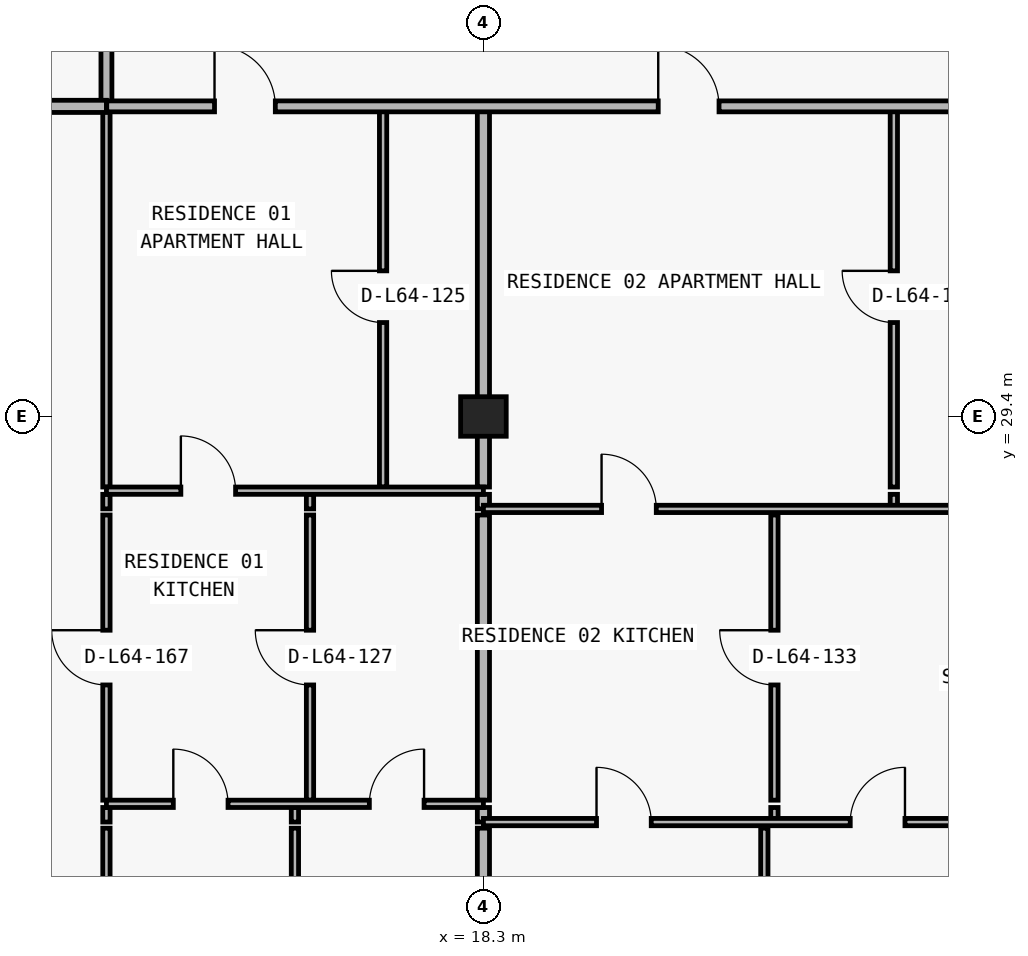
"""IFC4 building model, lengths in metres.
Left out: names, types, materials, properties, quantities, classifications, styles, units other than length and angle.
Written with IfcOpenShell. Run it as: python <this file> out.ifc"""

import sys

from ifc_helpers import new_model, si_unit, direction, frame, frame_2d, origin, origin_2d, place, context, subcontext, project, spatial, rectangle, extrude, element, fill, save


model = new_model("IFC4")
c1 = context("Model", 3, precision=1e-05, world=origin(), true_north=direction((0.0, 1.0)))
c2 = subcontext(c1, "Body", "Model", "MODEL_VIEW")
j1 = project(units=[si_unit("LENGTHUNIT", "METRE"), si_unit("PLANEANGLEUNIT", "RADIAN")], contexts=[c1])
p1 = place(None, origin())
s1 = spatial("IfcSite", under=j1, at=p1, CompositionType="ELEMENT")
p2 = place(p1, origin())
s2 = spatial("IfcBuilding", under=s1, at=p2, CompositionType="ELEMENT")
p3 = place(p2, frame((0.0, 0.0, 229.8)))
s3 = spatial("IfcBuildingStorey", under=s2, at=p3, CompositionType="ELEMENT", Elevation=229.8)
p4 = place(p3, frame((18.3, 29.4, 0.0), z_axis=(0.0, 0.0, 1.0), x_axis=(1.0, 0.0, 0.0)))
e1 = element("IfcColumn", 1, at=p4, inside=s3, PredefinedType="COLUMN", context=c2, shape_type="SweptSolid", body=[
    extrude(rectangle(XDim=0.75, YDim=0.65, at=origin_2d()), origin(), (0.0, 0.0, 1.0), 3.05),
])
p5 = place(p3, frame((12.1, 13.385, 0.0), z_axis=(0.0, 0.0, 1.0), x_axis=(0.0, 1.0, 0.0)))
e2 = element("IfcWall", 2, at=p5, inside=s3, PredefinedType="PARTITIONING", context=c2, shape_type="SweptSolid", body=[
    extrude(rectangle(XDim=9.245, YDim=0.12, at=frame_2d((4.623, 0.0))), origin(), (0.0, 0.0, 1.0), 3.05),
])
p6 = place(p3, frame((12.1, 22.73, 0.0), z_axis=(0.0, 0.0, 1.0), x_axis=(0.0, 1.0, 0.0)))
e3 = element("IfcWall", 3, at=p6, inside=s3, PredefinedType="PARTITIONING", context=c2, shape_type="SweptSolid", body=[
    extrude(rectangle(XDim=0.24, YDim=0.12, at=frame_2d((0.12, 0.0))), origin(), (0.0, 0.0, 1.0), 3.05),
])
p7 = place(p3, frame((12.1, 23.09, 0.0), z_axis=(0.0, 0.0, 1.0), x_axis=(0.0, 1.0, 0.0)))
e4 = element("IfcWall", 4, at=p7, inside=s3, PredefinedType="PARTITIONING", context=c2, shape_type="SweptSolid", body=[
    extrude(rectangle(XDim=4.69, YDim=0.12, at=frame_2d((2.345, 0.0))), origin(), (0.0, 0.0, 1.0), 3.05),
])
p8 = place(p7, frame((1.895, 0.0, 0.0)))
e5 = element("IfcOpeningElement", 5, at=p8, cuts=e4, PredefinedType="OPENING", context=c2, shape_type="SweptSolid", body=[
    extrude(rectangle(XDim=0.9, YDim=2.15, at=frame_2d((0.45, 1.075))), frame((0.0, 0.07, 0.0), z_axis=(0.0, -1.0, 0.0), x_axis=(1.0, 0.0, 0.0)), (0.0, 0.0, 1.0), 0.14),
])
p9 = place(p3, frame((12.1, 27.88, 0.0), z_axis=(0.0, 0.0, 1.0), x_axis=(0.0, 1.0, 0.0)))
e6 = element("IfcWall", 6, at=p9, inside=s3, PredefinedType="PARTITIONING", context=c2, shape_type="SweptSolid", body=[
    extrude(rectangle(XDim=0.24, YDim=0.12, at=frame_2d((0.12, 0.0))), origin(), (0.0, 0.0, 1.0), 3.05),
])
p10 = place(p3, frame((12.1, 28.24, 0.0), z_axis=(0.0, 0.0, 1.0), x_axis=(0.0, 1.0, 0.0)))
e7 = element("IfcWall", 7, at=p10, inside=s3, PredefinedType="PARTITIONING", context=c2, shape_type="SweptSolid", body=[
    extrude(rectangle(XDim=6.26, YDim=0.12, at=frame_2d((3.13, 0.0))), origin(), (0.0, 0.0, 1.0), 3.05),
])
p11 = place(p3, frame((12.1, 34.505, 0.0), z_axis=(0.0, 0.0, 1.0), x_axis=(0.0, 1.0, 0.0)))
e8 = element("IfcWall", 8, at=p11, inside=s3, PredefinedType="PARTITIONING", context=c2, shape_type="SweptSolid", body=[
    extrude(rectangle(XDim=2.495, YDim=0.18, at=frame_2d((1.248, 0.0))), origin(), (0.0, 0.0, 1.0), 3.05),
])
p12 = place(p3, frame((15.2, 13.34, 0.0), z_axis=(0.0, 0.0, 1.0), x_axis=(0.0, 1.0, 0.0)))
e9 = element("IfcWall", 9, at=p12, inside=s3, PredefinedType="PARTITIONING", context=c2, shape_type="SweptSolid", body=[
    extrude(rectangle(XDim=9.29, YDim=0.12, at=frame_2d((4.645, 0.0))), origin(), (0.0, 0.0, 1.0), 3.05),
])
p13 = place(p3, frame((15.2, 22.73, 0.0), z_axis=(0.0, 0.0, 1.0), x_axis=(0.0, 1.0, 0.0)))
e10 = element("IfcWall", 10, at=p13, inside=s3, PredefinedType="PARTITIONING", context=c2, shape_type="SweptSolid", body=[
    extrude(rectangle(XDim=0.24, YDim=0.12, at=frame_2d((0.12, 0.0))), origin(), (0.0, 0.0, 1.0), 3.05),
])
p14 = place(p3, frame((15.448, 23.09, 0.0), z_axis=(0.0, 0.0, 1.0), x_axis=(0.0, 1.0, 0.0)))
e11 = element("IfcWall", 11, at=p14, inside=s3, PredefinedType="PARTITIONING", context=c2, shape_type="SweptSolid", body=[
    extrude(rectangle(XDim=4.69, YDim=0.12, at=frame_2d((2.345, 0.0))), origin(), (0.0, 0.0, 1.0), 2.725),
])
p15 = place(p14, frame((1.895, 0.0, 0.0)))
e12 = element("IfcOpeningElement", 12, at=p15, cuts=e11, PredefinedType="OPENING", context=c2, shape_type="SweptSolid", body=[
    extrude(rectangle(XDim=0.9, YDim=2.15, at=frame_2d((0.45, 1.075))), frame((0.0, 0.07, 0.0), z_axis=(0.0, -1.0, 0.0), x_axis=(1.0, 0.0, 0.0)), (0.0, 0.0, 1.0), 0.14),
])
p16 = place(p3, frame((15.448, 27.88, 0.0), z_axis=(0.0, 0.0, 1.0), x_axis=(0.0, 1.0, 0.0)))
e13 = element("IfcWall", 13, at=p16, inside=s3, PredefinedType="PARTITIONING", context=c2, shape_type="SweptSolid", body=[
    extrude(rectangle(XDim=0.24, YDim=0.12, at=frame_2d((0.12, 0.0))), origin(), (0.0, 0.0, 1.0), 2.725),
])
p17 = place(p3, frame((16.65, 28.24, 0.0), z_axis=(0.0, 0.0, 1.0), x_axis=(0.0, 1.0, 0.0)))
e14 = element("IfcWall", 14, at=p17, inside=s3, PredefinedType="PARTITIONING", context=c2, shape_type="SweptSolid", body=[
    extrude(rectangle(XDim=6.26, YDim=0.12, at=frame_2d((3.13, 0.0))), origin(), (0.0, 0.0, 1.0), 3.05),
])
p18 = place(p17, frame((2.705, 0.0, 0.0)))
e15 = element("IfcOpeningElement", 15, at=p18, cuts=e14, PredefinedType="OPENING", context=c2, shape_type="SweptSolid", body=[
    extrude(rectangle(XDim=0.85, YDim=2.1, at=frame_2d((0.425, 1.05))), frame((0.0, 0.07, 0.0), z_axis=(0.0, -1.0, 0.0), x_axis=(1.0, 0.0, 0.0)), (0.0, 0.0, 1.0), 0.14),
])
p19 = place(p3, frame((18.3, 13.34, 0.0), z_axis=(0.0, 0.0, 1.0), x_axis=(0.0, 1.0, 0.0)))
e16 = element("IfcWall", 16, at=p19, inside=s3, PredefinedType="PARTITIONING", context=c2, shape_type="SweptSolid", body=[
    extrude(rectangle(XDim=9.29, YDim=0.2, at=frame_2d((4.645, 0.0))), origin(), (0.0, 0.0, 1.0), 2.263),
])
p20 = place(p3, frame((18.3, 22.73, 0.0), z_axis=(0.0, 0.0, 1.0), x_axis=(0.0, 1.0, 0.0)))
e17 = element("IfcWall", 17, at=p20, inside=s3, PredefinedType="PARTITIONING", context=c2, shape_type="SweptSolid", body=[
    extrude(rectangle(XDim=0.24, YDim=0.2, at=frame_2d((0.12, 0.0))), origin(), (0.0, 0.0, 1.0), 2.263),
])
p21 = place(p3, frame((18.3, 23.09, 0.0), z_axis=(0.0, 0.0, 1.0), x_axis=(0.0, 1.0, 0.0)))
e18 = element("IfcWall", 18, at=p21, inside=s3, PredefinedType="PARTITIONING", context=c2, shape_type="SweptSolid", body=[
    extrude(rectangle(XDim=4.69, YDim=0.2, at=frame_2d((2.345, 0.0))), origin(), (0.0, 0.0, 1.0), 2.263),
])
p22 = place(p3, frame((18.3, 27.88, 0.0), z_axis=(0.0, 0.0, 1.0), x_axis=(0.0, 1.0, 0.0)))
e19 = element("IfcWall", 19, at=p22, inside=s3, PredefinedType="PARTITIONING", context=c2, shape_type="SweptSolid", body=[
    extrude(rectangle(XDim=0.24, YDim=0.2, at=frame_2d((0.12, 0.0))), origin(), (0.0, 0.0, 1.0), 2.263),
])
p23 = place(p3, frame((18.3, 28.24, 0.0), z_axis=(0.0, 0.0, 1.0), x_axis=(0.0, 1.0, 0.0)))
e20 = element("IfcWall", 20, at=p23, inside=s3, PredefinedType="PARTITIONING", context=c2, shape_type="SweptSolid", body=[
    extrude(rectangle(XDim=6.26, YDim=0.2, at=frame_2d((3.13, 0.0))), origin(), (0.0, 0.0, 1.0), 2.263),
])
p24 = place(p3, frame((22.92, 13.34, 0.0), z_axis=(0.0, 0.0, 1.0), x_axis=(0.0, 1.0, 0.0)))
e21 = element("IfcWall", 21, at=p24, inside=s3, PredefinedType="PARTITIONING", context=c2, shape_type="SweptSolid", body=[
    extrude(rectangle(XDim=9.29, YDim=0.12, at=frame_2d((4.645, 0.0))), origin(), (0.0, 0.0, 1.0), 3.05),
])
p25 = place(p3, frame((23.086, 22.73, 0.0), z_axis=(0.0, 0.0, 1.0), x_axis=(0.0, 1.0, 0.0)))
e22 = element("IfcWall", 22, at=p25, inside=s3, PredefinedType="PARTITIONING", context=c2, shape_type="SweptSolid", body=[
    extrude(rectangle(XDim=0.24, YDim=0.12, at=frame_2d((0.12, 0.0))), origin(), (0.0, 0.0, 1.0), 3.05),
])
p26 = place(p3, frame((23.086, 23.09, 0.0), z_axis=(0.0, 0.0, 1.0), x_axis=(0.0, 1.0, 0.0)))
e23 = element("IfcWall", 23, at=p26, inside=s3, PredefinedType="PARTITIONING", context=c2, shape_type="SweptSolid", body=[
    extrude(rectangle(XDim=4.69, YDim=0.12, at=frame_2d((2.345, 0.0))), origin(), (0.0, 0.0, 1.0), 3.05),
])
p27 = place(p26, frame((1.895, 0.0, 0.0)))
e24 = element("IfcOpeningElement", 24, at=p27, cuts=e23, PredefinedType="OPENING", context=c2, shape_type="SweptSolid", body=[
    extrude(rectangle(XDim=0.9, YDim=2.15, at=frame_2d((0.45, 1.075))), frame((0.0, 0.07, 0.0), z_axis=(0.0, -1.0, 0.0), x_axis=(1.0, 0.0, 0.0)), (0.0, 0.0, 1.0), 0.14),
])
p28 = place(p3, frame((25.05, 27.88, 0.0), z_axis=(0.0, 0.0, 1.0), x_axis=(0.0, 1.0, 0.0)))
e25 = element("IfcWall", 25, at=p28, inside=s3, PredefinedType="PARTITIONING", context=c2, shape_type="SweptSolid", body=[
    extrude(rectangle(XDim=0.24, YDim=0.12, at=frame_2d((0.12, 0.0))), origin(), (0.0, 0.0, 1.0), 3.05),
])
p29 = place(p3, frame((25.05, 28.24, 0.0), z_axis=(0.0, 0.0, 1.0), x_axis=(0.0, 1.0, 0.0)))
e26 = element("IfcWall", 26, at=p29, inside=s3, PredefinedType="PARTITIONING", context=c2, shape_type="SweptSolid", body=[
    extrude(rectangle(XDim=6.26, YDim=0.12, at=frame_2d((3.13, 0.0))), origin(), (0.0, 0.0, 1.0), 3.05),
])
p30 = place(p29, frame((2.705, 0.0, 0.0)))
e27 = element("IfcOpeningElement", 27, at=p30, cuts=e26, PredefinedType="OPENING", context=c2, shape_type="SweptSolid", body=[
    extrude(rectangle(XDim=0.85, YDim=2.1, at=frame_2d((0.425, 1.05))), frame((0.0, 0.07, 0.0), z_axis=(0.0, -1.0, 0.0), x_axis=(1.0, 0.0, 0.0)), (0.0, 0.0, 1.0), 0.14),
])
p31 = place(p3, frame((18.3, 22.73, 0.0), z_axis=(0.0, 0.0, 1.0), x_axis=(1.0, 0.0, 0.0)))
e28 = element("IfcWall", 28, at=p31, inside=s3, PredefinedType="PARTITIONING", context=c2, shape_type="SweptSolid", body=[
    extrude(rectangle(XDim=8.18, YDim=0.12, at=frame_2d((4.09, 0.0))), origin(), (0.0, 0.0, 1.0), 3.05),
])
p32 = place(p31, frame((1.86, 0.0, 0.0)))
e29 = element("IfcOpeningElement", 29, at=p32, cuts=e28, PredefinedType="OPENING", context=c2, shape_type="SweptSolid", body=[
    extrude(rectangle(XDim=0.9, YDim=2.15, at=frame_2d((0.45, 1.075))), frame((0.0, 0.07, 0.0), z_axis=(0.0, -1.0, 0.0), x_axis=(1.0, 0.0, 0.0)), (0.0, 0.0, 1.0), 0.14),
])
p33 = place(p31, frame((6.033, 0.0, 0.0)))
e30 = element("IfcOpeningElement", 30, at=p33, cuts=e28, PredefinedType="OPENING", context=c2, shape_type="SweptSolid", body=[
    extrude(rectangle(XDim=0.9, YDim=2.15, at=frame_2d((0.45, 1.075))), frame((0.0, 0.07, 0.0), z_axis=(0.0, -1.0, 0.0), x_axis=(1.0, 0.0, 0.0)), (0.0, 0.0, 1.0), 0.14),
])
p34 = place(p3, frame((12.1, 23.03, 0.0), z_axis=(0.0, 0.0, 1.0), x_axis=(1.0, 0.0, 0.0)))
e31 = element("IfcWall", 31, at=p34, inside=s3, PredefinedType="PARTITIONING", context=c2, shape_type="SweptSolid", body=[
    extrude(rectangle(XDim=6.2, YDim=0.12, at=frame_2d((3.1, 0.0))), origin(), (0.0, 0.0, 1.0), 3.05),
])
p35 = place(p34, frame((1.1, 0.0, 0.0)))
e32 = element("IfcOpeningElement", 32, at=p35, cuts=e31, PredefinedType="OPENING", context=c2, shape_type="SweptSolid", body=[
    extrude(rectangle(XDim=0.9, YDim=2.15, at=frame_2d((0.45, 1.075))), frame((0.0, 0.07, 0.0), z_axis=(0.0, -1.0, 0.0), x_axis=(1.0, 0.0, 0.0)), (0.0, 0.0, 1.0), 0.14),
])
p36 = place(p34, frame((4.324, 0.0, 0.0)))
e33 = element("IfcOpeningElement", 33, at=p36, cuts=e31, PredefinedType="OPENING", context=c2, shape_type="SweptSolid", body=[
    extrude(rectangle(XDim=0.9, YDim=2.15, at=frame_2d((0.45, 1.075))), frame((0.0, 0.07, 0.0), z_axis=(0.0, -1.0, 0.0), x_axis=(1.0, 0.0, 0.0)), (0.0, 0.0, 1.0), 0.14),
])
p37 = place(p3, frame((18.3, 27.88, 0.0), z_axis=(0.0, 0.0, 1.0), x_axis=(1.0, 0.0, 0.0)))
e34 = element("IfcWall", 34, at=p37, inside=s3, PredefinedType="PARTITIONING", context=c2, shape_type="SweptSolid", body=[
    extrude(rectangle(XDim=8.18, YDim=0.12, at=frame_2d((4.09, 0.0))), origin(), (0.0, 0.0, 1.0), 3.05),
])
p38 = place(p37, frame((1.943, 0.0, 0.0)))
e35 = element("IfcOpeningElement", 35, at=p38, cuts=e34, PredefinedType="OPENING", context=c2, shape_type="SweptSolid", body=[
    extrude(rectangle(XDim=0.9, YDim=2.15, at=frame_2d((0.45, 1.075))), frame((0.0, 0.07, 0.0), z_axis=(0.0, -1.0, 0.0), x_axis=(1.0, 0.0, 0.0)), (0.0, 0.0, 1.0), 0.14),
])
p39 = place(p3, frame((12.1, 28.18, 0.0), z_axis=(0.0, 0.0, 1.0), x_axis=(1.0, 0.0, 0.0)))
e36 = element("IfcWall", 36, at=p39, inside=s3, PredefinedType="PARTITIONING", context=c2, shape_type="SweptSolid", body=[
    extrude(rectangle(XDim=6.2, YDim=0.12, at=frame_2d((3.1, 0.0))), origin(), (0.0, 0.0, 1.0), 3.05),
])
p40 = place(p39, frame((1.224, 0.0, 0.0)))
e37 = element("IfcOpeningElement", 37, at=p40, cuts=e36, PredefinedType="OPENING", context=c2, shape_type="SweptSolid", body=[
    extrude(rectangle(XDim=0.9, YDim=2.15, at=frame_2d((0.45, 1.075))), frame((0.0, 0.07, 0.0), z_axis=(0.0, -1.0, 0.0), x_axis=(1.0, 0.0, 0.0)), (0.0, 0.0, 1.0), 0.14),
])
p41 = place(p3, frame((8.395, 34.5, 0.0), z_axis=(0.0, 0.0, 1.0), x_axis=(1.0, 0.0, 0.0)))
e38 = element("IfcWall", 38, at=p41, inside=s3, PredefinedType="PARTITIONING", context=c2, shape_type="SweptSolid", body=[
    extrude(rectangle(XDim=3.705, YDim=0.2, at=frame_2d((1.853, 0.0))), origin(), (0.0, 0.0, 1.0), 3.05),
])
p42 = place(p3, frame((12.105, 34.5, 0.0), z_axis=(0.0, 0.0, 1.0), x_axis=(1.0, 0.0, 0.0)))
e39 = element("IfcWall", 39, at=p42, inside=s3, PredefinedType="PARTITIONING", context=c2, shape_type="SweptSolid", body=[
    extrude(rectangle(XDim=14.545, YDim=0.18, at=frame_2d((7.272, 0.0))), origin(), (0.0, 0.0, 1.0), 3.05),
])
p43 = place(p42, frame((1.772, 0.0, 0.0)))
e40 = element("IfcOpeningElement", 40, at=p43, cuts=e39, PredefinedType="OPENING", context=c2, shape_type="SweptSolid", body=[
    extrude(rectangle(XDim=1.0, YDim=2.2, at=frame_2d((0.5, 1.1))), frame((0.0, 0.1, 0.0), z_axis=(0.0, -1.0, 0.0), x_axis=(1.0, 0.0, 0.0)), (0.0, 0.0, 1.0), 0.2),
])
p44 = place(p42, frame((9.07, 0.0, 0.0)))
e41 = element("IfcOpeningElement", 41, at=p44, cuts=e39, PredefinedType="OPENING", context=c2, shape_type="SweptSolid", body=[
    extrude(rectangle(XDim=1.0, YDim=2.2, at=frame_2d((0.5, 1.1))), frame((0.0, 0.1, 0.0), z_axis=(0.0, -1.0, 0.0), x_axis=(1.0, 0.0, 0.0)), (0.0, 0.0, 1.0), 0.2),
])
p45 = place(p43, origin())
e42 = element("IfcDoor", 42, at=p45, inside=s3, OperationType="SINGLE_SWING_LEFT", PredefinedType="DOOR", context=c2, shape_type="SweptSolid", body=[
    extrude(rectangle(XDim=1.0, YDim=2.2, at=frame_2d((0.5, 1.1))), frame((0.0, 0.025, 0.0), z_axis=(0.0, -1.0, 0.0), x_axis=(1.0, 0.0, 0.0)), (0.0, 0.0, 1.0), 0.05),
])
fill(e40, e42)
p46 = place(p18, origin())
e43 = element("IfcDoor", 43, at=p46, inside=s3, OperationType="SINGLE_SWING_RIGHT", PredefinedType="DOOR", context=c2, shape_type="SweptSolid", body=[
    extrude(rectangle(XDim=0.85, YDim=2.1, at=frame_2d((0.425, 1.05))), frame((0.0, 0.025, 0.0), z_axis=(0.0, -1.0, 0.0), x_axis=(1.0, 0.0, 0.0)), (0.0, 0.0, 1.0), 0.05),
])
fill(e15, e43)
p47 = place(p40, origin())
e44 = element("IfcDoor", 44, at=p47, inside=s3, OperationType="SINGLE_SWING_LEFT", PredefinedType="DOOR", context=c2, shape_type="SweptSolid", body=[
    extrude(rectangle(XDim=0.9, YDim=2.15, at=frame_2d((0.45, 1.075))), frame((0.0, 0.025, 0.0), z_axis=(0.0, -1.0, 0.0), x_axis=(1.0, 0.0, 0.0)), (0.0, 0.0, 1.0), 0.05),
])
fill(e37, e44)
p48 = place(p15, origin())
e45 = element("IfcDoor", 45, at=p48, inside=s3, OperationType="SINGLE_SWING_RIGHT", PredefinedType="DOOR", context=c2, shape_type="SweptSolid", body=[
    extrude(rectangle(XDim=0.9, YDim=2.15, at=frame_2d((0.45, 1.075))), frame((0.0, 0.025, 0.0), z_axis=(0.0, -1.0, 0.0), x_axis=(1.0, 0.0, 0.0)), (0.0, 0.0, 1.0), 0.05),
])
fill(e12, e45)
p49 = place(p35, origin())
e46 = element("IfcDoor", 46, at=p49, inside=s3, OperationType="SINGLE_SWING_LEFT", PredefinedType="DOOR", context=c2, shape_type="SweptSolid", body=[
    extrude(rectangle(XDim=0.9, YDim=2.15, at=frame_2d((0.45, 1.075))), frame((0.0, 0.025, 0.0), z_axis=(0.0, -1.0, 0.0), x_axis=(1.0, 0.0, 0.0)), (0.0, 0.0, 1.0), 0.05),
])
fill(e32, e46)
p50 = place(p36, origin())
e47 = element("IfcDoor", 47, at=p50, inside=s3, OperationType="SINGLE_SWING_RIGHT", PredefinedType="DOOR", context=c2, shape_type="SweptSolid", body=[
    extrude(rectangle(XDim=0.9, YDim=2.15, at=frame_2d((0.45, 1.075))), frame((0.0, 0.025, 0.0), z_axis=(0.0, -1.0, 0.0), x_axis=(1.0, 0.0, 0.0)), (0.0, 0.0, 1.0), 0.05),
])
fill(e33, e47)
p51 = place(p44, origin())
e48 = element("IfcDoor", 48, at=p51, inside=s3, OperationType="SINGLE_SWING_LEFT", PredefinedType="DOOR", context=c2, shape_type="SweptSolid", body=[
    extrude(rectangle(XDim=1.0, YDim=2.2, at=frame_2d((0.5, 1.1))), frame((0.0, 0.025, 0.0), z_axis=(0.0, -1.0, 0.0), x_axis=(1.0, 0.0, 0.0)), (0.0, 0.0, 1.0), 0.05),
])
fill(e41, e48)
p52 = place(p30, origin())
e49 = element("IfcDoor", 49, at=p52, inside=s3, OperationType="SINGLE_SWING_RIGHT", PredefinedType="DOOR", context=c2, shape_type="SweptSolid", body=[
    extrude(rectangle(XDim=0.85, YDim=2.1, at=frame_2d((0.425, 1.05))), frame((0.0, 0.025, 0.0), z_axis=(0.0, -1.0, 0.0), x_axis=(1.0, 0.0, 0.0)), (0.0, 0.0, 1.0), 0.05),
])
fill(e27, e49)
p53 = place(p38, origin())
e50 = element("IfcDoor", 50, at=p53, inside=s3, OperationType="SINGLE_SWING_LEFT", PredefinedType="DOOR", context=c2, shape_type="SweptSolid", body=[
    extrude(rectangle(XDim=0.9, YDim=2.15, at=frame_2d((0.45, 1.075))), frame((0.0, 0.025, 0.0), z_axis=(0.0, -1.0, 0.0), x_axis=(1.0, 0.0, 0.0)), (0.0, 0.0, 1.0), 0.05),
])
fill(e35, e50)
p54 = place(p27, origin())
e51 = element("IfcDoor", 51, at=p54, inside=s3, OperationType="SINGLE_SWING_RIGHT", PredefinedType="DOOR", context=c2, shape_type="SweptSolid", body=[
    extrude(rectangle(XDim=0.9, YDim=2.15, at=frame_2d((0.45, 1.075))), frame((0.0, 0.025, 0.0), z_axis=(0.0, -1.0, 0.0), x_axis=(1.0, 0.0, 0.0)), (0.0, 0.0, 1.0), 0.05),
])
fill(e24, e51)
p55 = place(p32, origin())
e52 = element("IfcDoor", 52, at=p55, inside=s3, OperationType="SINGLE_SWING_LEFT", PredefinedType="DOOR", context=c2, shape_type="SweptSolid", body=[
    extrude(rectangle(XDim=0.9, YDim=2.15, at=frame_2d((0.45, 1.075))), frame((0.0, 0.025, 0.0), z_axis=(0.0, -1.0, 0.0), x_axis=(1.0, 0.0, 0.0)), (0.0, 0.0, 1.0), 0.05),
])
fill(e29, e52)
p56 = place(p33, origin())
e53 = element("IfcDoor", 53, at=p56, inside=s3, OperationType="SINGLE_SWING_RIGHT", PredefinedType="DOOR", context=c2, shape_type="SweptSolid", body=[
    extrude(rectangle(XDim=0.9, YDim=2.15, at=frame_2d((0.45, 1.075))), frame((0.0, 0.025, 0.0), z_axis=(0.0, -1.0, 0.0), x_axis=(1.0, 0.0, 0.0)), (0.0, 0.0, 1.0), 0.05),
])
fill(e30, e53)
p57 = place(p8, origin())
e54 = element("IfcDoor", 54, at=p57, inside=s3, OperationType="SINGLE_SWING_RIGHT", PredefinedType="DOOR", context=c2, shape_type="SweptSolid", body=[
    extrude(rectangle(XDim=0.9, YDim=2.15, at=frame_2d((0.45, 1.075))), frame((0.0, 0.025, 0.0), z_axis=(0.0, -1.0, 0.0), x_axis=(1.0, 0.0, 0.0)), (0.0, 0.0, 1.0), 0.05),
])
fill(e5, e54)
save(model, sys.argv[1])
